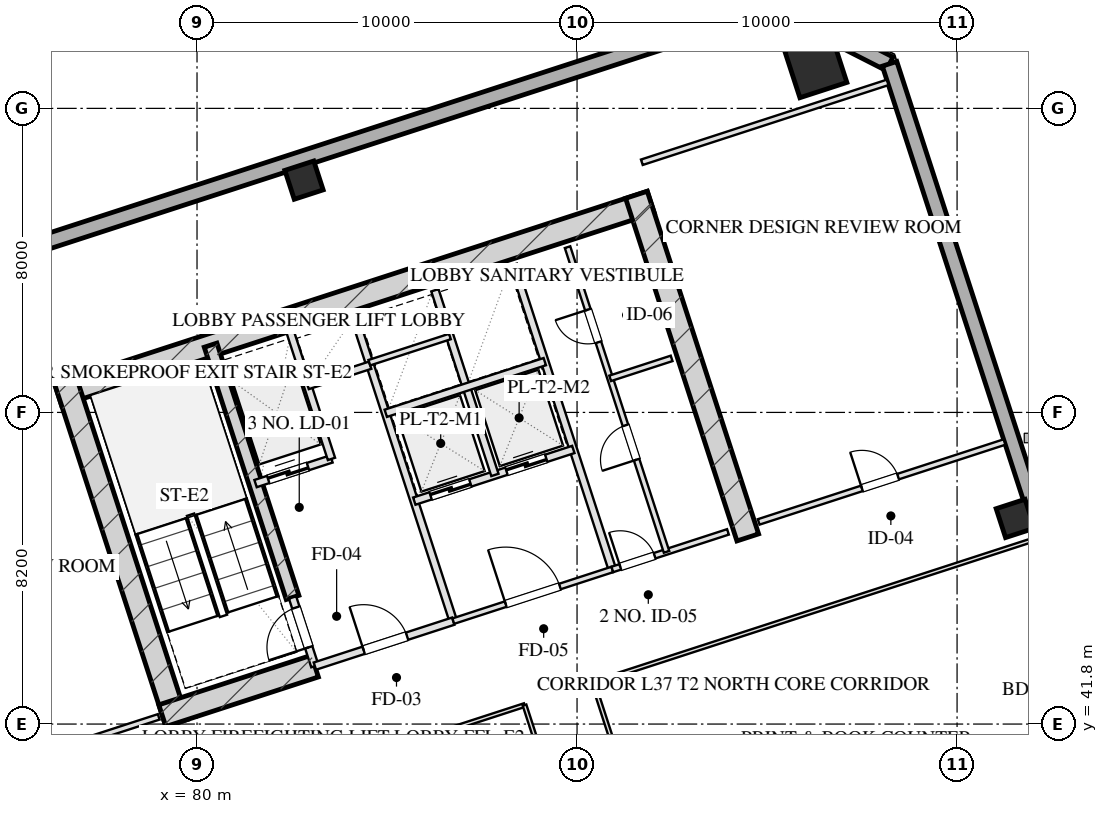
"""IFC4 building model, lengths in metres.
Left out: names, types, materials, properties, quantities, classifications, styles, units other than length and angle.
Written with IfcOpenShell. Run it as: python <this file> out.ifc"""

import sys

from ifc_helpers import new_model, si_unit, direction, frame, frame_2d, origin, origin_2d, place, context, subcontext, project, spatial, rectangle, hollow_rectangle, extrude, element, fill, save


model = new_model("IFC4")
c1 = context("Model", 3, precision=1e-05, world=origin(), true_north=direction((0.0, 1.0)))
c2 = subcontext(c1, "Body", "Model", "MODEL_VIEW")
j1 = project(units=[si_unit("LENGTHUNIT", "METRE"), si_unit("PLANEANGLEUNIT", "RADIAN")], contexts=[c1])
p1 = place(None, origin())
s1 = spatial("IfcSite", under=j1, at=p1, CompositionType="ELEMENT")
p2 = place(p1, origin())
s2 = spatial("IfcBuilding", under=s1, at=p2, CompositionType="ELEMENT")
p3 = place(p2, frame((0.0, 0.0, 142.6)))
s3 = spatial("IfcBuildingStorey", under=s2, at=p3, CompositionType="ELEMENT", Elevation=142.6)
p4 = place(p3, frame((76.344, 50.466, 0.0), z_axis=(0.0, 0.0, 1.0), x_axis=(0.951055727519, 0.309019421968, 0.0)))
e1 = element("IfcWall", 1, at=p4, inside=s3, PredefinedType="SHEAR", context=c2, shape_type="SweptSolid", body=[
    extrude(rectangle(XDim=16.4, YDim=0.6, at=frame_2d((8.2, 0.0))), origin(), (0.0, 0.0, 1.0), 3.45),
])
for number, where, z_axis, x_axis in (
    (2, (79.466, 41.828, 0.0), (0.0, 0.0, 1.0), (-0.309, 0.951, 0.0)),
    (3, (94.492, 46.71, 0.0), (0.0, 0.0, 1.0), (-0.309, 0.951, 0.0)),
):
    element("IfcWall", number, at=place(p3, frame(where, z_axis=z_axis, x_axis=x_axis)), inside=s3, PredefinedType="SHEAR", context=c2, shape_type="SweptSolid", body=[
        extrude(rectangle(XDim=9.48, YDim=0.6, at=frame_2d((4.74, 0.0))), origin(), (0.0, 0.0, 1.0), 3.45),
    ])
p5 = place(p3, frame((82.514, 45.131, 0.0), z_axis=(0.0, 0.0, 1.0), x_axis=(-0.308988790936, 0.951065679686, 0.0)))
e4 = element("IfcWall", 4, at=p5, inside=s3, PredefinedType="SHEAR", context=c2, shape_type="SweptSolid", body=[
    extrude(rectangle(XDim=6.98, YDim=0.35, at=frame_2d((3.49, 0.0))), origin(), (0.0, 0.0, 1.0), 3.45),
])
p6 = place(p3, frame((79.087, 42.021, 0.0), z_axis=(0.0, 0.0, 1.0), x_axis=(0.951062550203, 0.3089984233, 0.0)))
e5 = element("IfcWall", 5, at=p6, inside=s3, PredefinedType="SHEAR", context=c2, shape_type="SweptSolid", body=[
    extrude(rectangle(XDim=4.22, YDim=0.6, at=frame_2d((2.11, 0.0))), origin(), (0.0, 0.0, 1.0), 3.45),
])
p7 = place(p3, frame((96.281, 59.099, 0.0), z_axis=(0.0, 0.0, 1.0), x_axis=(0.951056516295, 0.309016994375, 0.0)))
e6 = element("IfcColumn", 6, at=p7, inside=s3, PredefinedType="COLUMN", context=c2, shape_type="SweptSolid", body=[
    extrude(hollow_rectangle(XDim=1.3, YDim=1.3, WallThickness=0.045, at=origin_2d()), origin(), (0.0, 0.0, 1.0), 3.451),
])
for number, where, z_axis, x_axis in (
    (7, (101.532, 47.21, 0.0), (0.0, 0.0, 1.0), (0.951, 0.309, 0.0)),
    (8, (82.815, 56.112, 0.0), (0.0, 0.0, 1.0), (0.951, 0.309, 0.0)),
):
    element("IfcColumn", number, at=place(p3, frame(where, z_axis=z_axis, x_axis=x_axis)), inside=s3, PredefinedType="COLUMN", context=c2, shape_type="SweptSolid", body=[
        extrude(hollow_rectangle(XDim=0.8, YDim=0.8, WallThickness=0.028, at=origin_2d()), origin(), (0.0, 0.0, 1.0), 3.451),
    ])
p8 = place(p3, frame((81.776, 8.827, 0.0), z_axis=(0.0, 0.0, 1.0), x_axis=(-0.309014228706, 0.951057414911, 0.0)))
e9 = element("IfcWall", 9, at=p8, inside=s3, PredefinedType="SOLIDWALL", context=c2, shape_type="SweptSolid", body=[
    extrude(rectangle(XDim=42.8, YDim=0.4, at=frame_2d((21.4, 0.0))), origin(), (0.0, 0.0, 1.0), 2.61),
])
p9 = place(p8, frame((23.95, 0.0, 0.0)))
e10 = element("IfcOpeningElement", 10, at=p9, cuts=e9, PredefinedType="OPENING", context=c2, shape_type="SweptSolid", body=[
    extrude(rectangle(XDim=1.1, YDim=2.15, at=frame_2d((0.55, 1.075))), frame((0.0, 0.21, 0.0), z_axis=(0.0, -1.0, 0.0), x_axis=(1.0, 0.0, 0.0)), (0.0, 0.0, 1.0), 0.42),
])
p10 = place(p3, frame((70.092, 52.556, 0.0), z_axis=(0.0, 0.0, 1.0), x_axis=(0.951057580055, 0.30901372044, 0.0)))
e11 = element("IfcWall", 11, at=p10, inside=s3, PredefinedType="SOLIDWALL", context=c2, shape_type="SweptSolid", body=[
    extrude(rectangle(XDim=26.4, YDim=0.4, at=frame_2d((13.2, 0.0))), origin(), (0.0, 0.0, 1.0), 2.61),
])
p11 = place(p3, frame((95.199, 60.714, 0.0), z_axis=(0.0, 0.0, 1.0), x_axis=(0.891020832027, -0.453962417932, 0.0)))
e12 = element("IfcWall", 12, at=p11, inside=s3, PredefinedType="SOLIDWALL", context=c2, shape_type="SweptSolid", body=[
    extrude(rectangle(XDim=3.394, YDim=0.4, at=frame_2d((1.697, 0.0))), origin(), (0.0, 0.0, 1.0), 2.61),
])
p12 = place(p3, frame((98.224, 59.173, 0.0), z_axis=(0.0, 0.0, 1.0), x_axis=(0.309014228706, -0.951057414911, 0.0)))
e13 = element("IfcWall", 13, at=p12, inside=s3, PredefinedType="SOLIDWALL", context=c2, shape_type="SweptSolid", body=[
    extrude(rectangle(XDim=42.8, YDim=0.4, at=frame_2d((21.4, 0.0))), origin(), (0.0, 0.0, 1.0), 2.61),
])
p13 = place(p12, frame((26.675, 0.0, 0.75)))
e14 = element("IfcOpeningElement", 14, at=p13, cuts=e13, PredefinedType="OPENING", context=c2, shape_type="SweptSolid", body=[
    extrude(rectangle(XDim=2.25, YDim=1.46, at=frame_2d((1.125, 0.73))), frame((0.0, 0.21, 0.0), z_axis=(0.0, -1.0, 0.0), x_axis=(1.0, 0.0, 0.0)), (0.0, 0.0, 1.0), 0.42),
])
p14 = place(p12, frame((16.45, 0.0, 0.0)))
e15 = element("IfcOpeningElement", 15, at=p14, cuts=e13, PredefinedType="OPENING", context=c2, shape_type="SweptSolid", body=[
    extrude(rectangle(XDim=1.1, YDim=2.15, at=frame_2d((0.55, 1.075))), frame((0.0, 0.21, 0.0), z_axis=(0.0, -1.0, 0.0), x_axis=(1.0, 0.0, 0.0)), (0.0, 0.0, 1.0), 0.42),
])
p15 = place(p3, frame((83.101, 43.324, 0.0), z_axis=(0.0, 0.0, 1.0), x_axis=(-0.309048298632, 0.951046344356, 0.0)))
e16 = element("IfcWall", 16, at=p15, inside=s3, PredefinedType="PARTITIONING", context=c2, shape_type="SweptSolid", body=[
    extrude(rectangle(XDim=1.9, YDim=0.2, at=frame_2d((0.95, 0.0))), origin(), (0.0, 0.0, 1.0), 3.175),
])
p16 = place(p15, frame((0.52, 0.0, 0.0)))
e17 = element("IfcOpeningElement", 17, at=p16, cuts=e16, PredefinedType="OPENING", context=c2, shape_type="SweptSolid", body=[
    extrude(rectangle(XDim=1.1, YDim=2.05, at=frame_2d((0.55, 1.025))), frame((0.0, 0.11, 0.0), z_axis=(0.0, -1.0, 0.0), x_axis=(1.0, 0.0, 0.0)), (0.0, 0.0, 1.0), 0.22),
])
p17 = place(p3, frame((86.743, 44.508, 0.0), z_axis=(0.0, 0.0, 1.0), x_axis=(-0.309016001439, 0.951056838919, 0.0)))
e18 = element("IfcWall", 18, at=p17, inside=s3, PredefinedType="PARTITIONING", context=c2, shape_type="SweptSolid", body=[
    extrude(rectangle(XDim=8.43, YDim=0.2, at=frame_2d((4.215, 0.0))), origin(), (0.0, 0.0, 1.0), 3.175),
])
p18 = place(p3, frame((83.101, 43.324, 0.0), z_axis=(0.0, 0.0, 1.0), x_axis=(0.951052804469, 0.309028417967, 0.0)))
e19 = element("IfcWall", 19, at=p18, inside=s3, PredefinedType="PARTITIONING", context=c2, shape_type="SweptSolid", body=[
    extrude(rectangle(XDim=3.83, YDim=0.2, at=frame_2d((1.915, 0.0))), origin(), (0.0, 0.0, 1.0), 3.175),
])
p19 = place(p18, frame((1.35, 0.0, 0.0)))
e20 = element("IfcOpeningElement", 20, at=p19, cuts=e19, PredefinedType="OPENING", context=c2, shape_type="SweptSolid", body=[
    extrude(rectangle(XDim=1.2, YDim=2.05, at=frame_2d((0.6, 1.025))), frame((0.0, 0.11, 0.0), z_axis=(0.0, -1.0, 0.0), x_axis=(1.0, 0.0, 0.0)), (0.0, 0.0, 1.0), 0.22),
])
p20 = place(p3, frame((81.54, 48.127, 0.0), z_axis=(0.0, 0.0, 1.0), x_axis=(0.951062257173, 0.308999325213, 0.0)))
e21 = element("IfcWall", 21, at=p20, inside=s3, PredefinedType="PARTITIONING", context=c2, shape_type="SweptSolid", body=[
    extrude(rectangle(XDim=2.1, YDim=0.2, at=frame_2d((1.05, 0.0))), origin(), (0.0, 0.0, 1.0), 3.175),
])
p21 = place(p20, frame((0.35, 0.0, 0.0)))
e22 = element("IfcOpeningElement", 22, at=p21, cuts=e21, PredefinedType="OPENING", context=c2, shape_type="SweptSolid", body=[
    extrude(rectangle(XDim=1.1, YDim=2.05, at=frame_2d((0.55, 1.025))), frame((0.0, 0.11, 0.0), z_axis=(0.0, -1.0, 0.0), x_axis=(1.0, 0.0, 0.0)), (0.0, 0.0, 1.0), 0.22),
])
p22 = place(p3, frame((83.538, 48.776, 0.0), z_axis=(0.0, 0.0, 1.0), x_axis=(-0.3089935693, 0.951064127245, 0.0)))
e23 = element("IfcWall", 23, at=p22, inside=s3, PredefinedType="PARTITIONING", context=c2, shape_type="SweptSolid", body=[
    extrude(rectangle(XDim=3.7, YDim=0.2, at=frame_2d((1.85, 0.0))), origin(), (0.0, 0.0, 1.0), 3.175),
])
p23 = place(p3, frame((82.91, 50.707, 0.0), z_axis=(0.0, 0.0, 1.0), x_axis=(0.951041328149, 0.309063734775, 0.0)))
e24 = element("IfcWall", 24, at=p23, inside=s3, PredefinedType="PARTITIONING", context=c2, shape_type="SweptSolid", body=[
    extrude(rectangle(XDim=1.73, YDim=0.2, at=frame_2d((0.865, 0.0))), origin(), (0.0, 0.0, 1.0), 3.175),
])
p24 = place(p3, frame((90.928, 45.868, 0.0), z_axis=(0.0, 0.0, 1.0), x_axis=(-0.309042196757, 0.951048327176, 0.0)))
e25 = element("IfcWall", 25, at=p24, inside=s3, PredefinedType="PARTITIONING", context=c2, shape_type="SweptSolid", body=[
    extrude(rectangle(XDim=8.43, YDim=0.2, at=frame_2d((4.215, 0.0))), origin(), (0.0, 0.0, 1.0), 3.175),
])
p25 = place(p3, frame((86.743, 44.508, 0.0), z_axis=(0.0, 0.0, 1.0), x_axis=(0.951063829732, 0.308994485023, 0.0)))
e26 = element("IfcWall", 26, at=p25, inside=s3, PredefinedType="PARTITIONING", context=c2, shape_type="SweptSolid", body=[
    extrude(rectangle(XDim=4.4, YDim=0.15, at=frame_2d((2.2, 0.0))), origin(), (0.0, 0.0, 1.0), 3.175),
])
p26 = place(p25, frame((1.45, 0.0, 0.0)))
e27 = element("IfcOpeningElement", 27, at=p26, cuts=e26, PredefinedType="OPENING", context=c2, shape_type="SweptSolid", body=[
    extrude(rectangle(XDim=1.5, YDim=2.05, at=frame_2d((0.75, 1.025))), frame((0.0, 0.085, 0.0), z_axis=(0.0, -1.0, 0.0), x_axis=(1.0, 0.0, 0.0)), (0.0, 0.0, 1.0), 0.17),
])
p27 = place(p3, frame((85.718, 47.666, 0.0), z_axis=(0.0, 0.0, 1.0), x_axis=(0.951058531764, 0.30901079133, 0.0)))
e28 = element("IfcWall", 28, at=p27, inside=s3, PredefinedType="PARTITIONING", context=c2, shape_type="SweptSolid", body=[
    extrude(rectangle(XDim=4.4, YDim=0.2, at=frame_2d((2.2, 0.0))), origin(), (0.0, 0.0, 1.0), 3.175),
])
p28 = place(p27, frame((0.45, 0.0, 0.0)))
e29 = element("IfcOpeningElement", 29, at=p28, cuts=e28, PredefinedType="OPENING", context=c2, shape_type="SweptSolid", body=[
    extrude(rectangle(XDim=1.1, YDim=2.05, at=frame_2d((0.55, 1.025))), frame((0.0, 0.11, 0.0), z_axis=(0.0, -1.0, 0.0), x_axis=(1.0, 0.0, 0.0)), (0.0, 0.0, 1.0), 0.22),
])
p29 = place(p27, frame((2.55, 0.0, 0.0)))
e30 = element("IfcOpeningElement", 30, at=p29, cuts=e28, PredefinedType="OPENING", context=c2, shape_type="SweptSolid", body=[
    extrude(rectangle(XDim=1.1, YDim=2.05, at=frame_2d((0.55, 1.025))), frame((0.0, 0.11, 0.0), z_axis=(0.0, -1.0, 0.0), x_axis=(1.0, 0.0, 0.0)), (0.0, 0.0, 1.0), 0.22),
])
p30 = place(p3, frame((87.838, 48.354, 0.0), z_axis=(0.0, 0.0, 1.0), x_axis=(-0.3090093719, 0.951058992953, 0.0)))
e31 = element("IfcWall", 31, at=p30, inside=s3, PredefinedType="PARTITIONING", context=c2, shape_type="SweptSolid", body=[
    extrude(rectangle(XDim=5.11, YDim=0.2, at=frame_2d((2.555, 0.0))), origin(), (0.0, 0.0, 1.0), 3.175),
])
p31 = place(p3, frame((84.967, 49.977, 0.0), z_axis=(0.0, 0.0, 1.0), x_axis=(0.951063829732, 0.308994485023, 0.0)))
e32 = element("IfcWall", 32, at=p31, inside=s3, PredefinedType="PARTITIONING", context=c2, shape_type="SweptSolid", body=[
    extrude(rectangle(XDim=4.4, YDim=0.2, at=frame_2d((2.2, 0.0))), origin(), (0.0, 0.0, 1.0), 3.175),
])
p32 = place(p3, frame((84.534, 51.308, 0.0), z_axis=(0.0, 0.0, 1.0), x_axis=(0.951075093106, 0.308959814982, 0.0)))
e33 = element("IfcWall", 33, at=p32, inside=s3, PredefinedType="PARTITIONING", context=c2, shape_type="SweptSolid", body=[
    extrude(rectangle(XDim=2.23, YDim=0.15, at=frame_2d((1.115, 0.0))), origin(), (0.0, 0.0, 1.0), 3.175),
])
p33 = place(p3, frame((90.928, 45.868, 0.0), z_axis=(0.0, 0.0, 1.0), x_axis=(0.951059297078, 0.309008435874, 0.0)))
e34 = element("IfcWall", 34, at=p33, inside=s3, PredefinedType="PARTITIONING", context=c2, shape_type="SweptSolid", body=[
    extrude(rectangle(XDim=3.2, YDim=0.15, at=frame_2d((1.6, 0.0))), origin(), (0.0, 0.0, 1.0), 3.175),
])
p34 = place(p33, frame((0.22, 0.0, 0.0)))
e35 = element("IfcOpeningElement", 35, at=p34, cuts=e34, PredefinedType="OPENING", context=c2, shape_type="SweptSolid", body=[
    extrude(rectangle(XDim=0.95, YDim=2.05, at=frame_2d((0.475, 1.025))), frame((0.0, 0.085, 0.0), z_axis=(0.0, -1.0, 0.0), x_axis=(1.0, 0.0, 0.0)), (0.0, 0.0, 1.0), 0.17),
])
p35 = place(p3, frame((92.355, 46.331, 0.0), z_axis=(0.0, 0.0, 1.0), x_axis=(-0.309007490203, 0.951059604335, 0.0)))
e36 = element("IfcWall", 36, at=p35, inside=s3, PredefinedType="PARTITIONING", context=c2, shape_type="SweptSolid", body=[
    extrude(rectangle(XDim=8.43, YDim=0.15, at=frame_2d((4.215, 0.0))), origin(), (0.0, 0.0, 1.0), 3.175),
])
p36 = place(p35, frame((2.55, 0.0, 0.0)))
e37 = element("IfcOpeningElement", 37, at=p36, cuts=e36, PredefinedType="OPENING", context=c2, shape_type="SweptSolid", body=[
    extrude(rectangle(XDim=0.95, YDim=2.05, at=frame_2d((0.475, 1.025))), frame((0.0, 0.085, 0.0), z_axis=(0.0, -1.0, 0.0), x_axis=(1.0, 0.0, 0.0)), (0.0, 0.0, 1.0), 0.17),
])
p37 = place(p35, frame((5.8, 0.0, 0.0)))
e38 = element("IfcOpeningElement", 38, at=p37, cuts=e36, PredefinedType="OPENING", context=c2, shape_type="SweptSolid", body=[
    extrude(rectangle(XDim=0.9, YDim=2.05, at=frame_2d((0.45, 1.025))), frame((0.0, 0.085, 0.0), z_axis=(0.0, -1.0, 0.0), x_axis=(1.0, 0.0, 0.0)), (0.0, 0.0, 1.0), 0.17),
])
p38 = place(p3, frame((90.871, 50.896, 0.0), z_axis=(0.0, 0.0, 1.0), x_axis=(0.951054116971, 0.309024378638, 0.0)))
e39 = element("IfcWall", 39, at=p38, inside=s3, PredefinedType="PARTITIONING", context=c2, shape_type="SweptSolid", body=[
    extrude(rectangle(XDim=1.7, YDim=0.15, at=frame_2d((0.85, 0.0))), origin(), (0.0, 0.0, 1.0), 3.175),
])
p39 = place(p3, frame((71.955, 39.703, 0.0), z_axis=(0.0, 0.0, 1.0), x_axis=(0.951060977215, 0.309003264738, 0.0)))
e40 = element("IfcWall", 40, at=p39, inside=s3, PredefinedType="PARTITIONING", context=c2, shape_type="SweptSolid", body=[
    extrude(rectangle(XDim=7.4, YDim=0.15, at=frame_2d((3.7, 0.0))), origin(), (0.0, 0.0, 1.0), 3.175),
])
p40 = place(p39, frame((3.108, 0.0, 0.0)))
e41 = element("IfcOpeningElement", 41, at=p40, cuts=e40, PredefinedType="OPENING", context=c2, shape_type="SweptSolid", body=[
    extrude(rectangle(XDim=1.05, YDim=2.05, at=frame_2d((0.525, 1.025))), frame((0.0, 0.085, 0.0), z_axis=(0.0, -1.0, 0.0), x_axis=(1.0, 0.0, 0.0)), (0.0, 0.0, 1.0), 0.17),
])
p41 = place(p3, frame((91.705, 56.582, 0.0), z_axis=(0.0, 0.0, 1.0), x_axis=(0.951057811516, 0.309013008068, 0.0)))
e42 = element("IfcWall", 42, at=p41, inside=s3, PredefinedType="PARTITIONING", context=c2, shape_type="SweptSolid", body=[
    extrude(rectangle(XDim=6.8, YDim=0.15, at=frame_2d((3.4, 0.0))), origin(), (0.0, 0.0, 1.0), 3.175),
])
p42 = place(p3, frame((94.78, 47.119, 0.0), z_axis=(0.0, 0.0, 1.0), x_axis=(0.951057811516, 0.309013008068, 0.0)))
e43 = element("IfcWall", 43, at=p42, inside=s3, PredefinedType="PARTITIONING", context=c2, shape_type="SweptSolid", body=[
    extrude(rectangle(XDim=6.8, YDim=0.15, at=frame_2d((3.4, 0.0))), origin(), (0.0, 0.0, 1.0), 3.175),
])
p43 = place(p42, frame((2.856, 0.0, 0.0)))
e44 = element("IfcOpeningElement", 44, at=p43, cuts=e43, PredefinedType="OPENING", context=c2, shape_type="SweptSolid", body=[
    extrude(rectangle(XDim=1.0, YDim=2.05, at=frame_2d((0.5, 1.025))), frame((0.0, 0.085, 0.0), z_axis=(0.0, -1.0, 0.0), x_axis=(1.0, 0.0, 0.0)), (0.0, 0.0, 1.0), 0.17),
])
p44 = place(p3, frame((80.106, 39.533, 0.0), z_axis=(0.0, 0.0, 1.0), x_axis=(0.951059123431, 0.309008970321, 0.0)))
e45 = element("IfcWall", 45, at=p44, inside=s3, PredefinedType="MOVABLE", context=c2, shape_type="SweptSolid", body=[
    extrude(rectangle(XDim=8.95, YDim=0.1, at=frame_2d((4.475, 0.0))), origin(), (0.0, 0.0, 1.0), 3.175),
])
p45 = place(p3, frame((90.425, 42.886, 0.0), z_axis=(0.0, 0.0, 1.0), x_axis=(0.95105749975, 0.309013967595, 0.0)))
e46 = element("IfcWall", 46, at=p45, inside=s3, PredefinedType="MOVABLE", context=c2, shape_type="SweptSolid", body=[
    extrude(rectangle(XDim=12.25, YDim=0.1, at=frame_2d((6.125, 0.0))), origin(), (0.0, 0.0, 1.0), 3.175),
])
p46 = place(p3, frame((93.76, 26.473, 0.0), z_axis=(0.0, 0.0, 1.0), x_axis=(-0.309004459387, 0.951060589068, 0.0)))
e47 = element("IfcWall", 47, at=p46, inside=s3, PredefinedType="MOVABLE", context=c2, shape_type="SweptSolid", body=[
    extrude(rectangle(XDim=16.64, YDim=0.1, at=frame_2d((8.32, 0.0))), origin(), (0.0, 0.0, 1.0), 3.175),
])
p47 = place(p46, frame((7.68, 0.0, 0.0)))
e48 = element("IfcOpeningElement", 48, at=p47, cuts=e47, PredefinedType="OPENING", context=c2, shape_type="SweptSolid", body=[
    extrude(rectangle(XDim=1.1, YDim=2.05, at=frame_2d((0.55, 1.025))), frame((0.0, 0.06, 0.0), z_axis=(0.0, -1.0, 0.0), x_axis=(1.0, 0.0, 0.0)), (0.0, 0.0, 1.0), 0.12),
])
p48 = place(p3, frame((95.567, 27.061, 0.0), z_axis=(0.0, 0.0, 1.0), x_axis=(-0.30901773025, 0.951056277195, 0.0)))
e49 = element("IfcWall", 49, at=p48, inside=s3, PredefinedType="MOVABLE", context=c2, shape_type="SweptSolid", body=[
    extrude(rectangle(XDim=16.64, YDim=0.1, at=frame_2d((8.32, 0.0))), origin(), (0.0, 0.0, 1.0), 3.175),
])
p49 = place(p48, frame((1.66, 0.0, 0.0)))
e50 = element("IfcOpeningElement", 50, at=p49, cuts=e49, PredefinedType="OPENING", context=c2, shape_type="SweptSolid", body=[
    extrude(rectangle(XDim=1.0, YDim=2.05, at=frame_2d((0.5, 1.025))), frame((0.0, 0.06, 0.0), z_axis=(0.0, -1.0, 0.0), x_axis=(1.0, 0.0, 0.0)), (0.0, 0.0, 1.0), 0.12),
])
p50 = place(p48, frame((6.42, 0.0, 0.0)))
e51 = element("IfcOpeningElement", 51, at=p50, cuts=e49, PredefinedType="OPENING", context=c2, shape_type="SweptSolid", body=[
    extrude(rectangle(XDim=1.0, YDim=2.05, at=frame_2d((0.5, 1.025))), frame((0.0, 0.06, 0.0), z_axis=(0.0, -1.0, 0.0), x_axis=(1.0, 0.0, 0.0)), (0.0, 0.0, 1.0), 0.12),
])
p51 = place(p48, frame((12.58, 0.0, 0.0)))
e52 = element("IfcOpeningElement", 52, at=p51, cuts=e49, PredefinedType="OPENING", context=c2, shape_type="SweptSolid", body=[
    extrude(rectangle(XDim=1.0, YDim=2.05, at=frame_2d((0.5, 1.025))), frame((0.0, 0.06, 0.0), z_axis=(0.0, -1.0, 0.0), x_axis=(1.0, 0.0, 0.0)), (0.0, 0.0, 1.0), 0.12),
])
p52 = place(p16, origin())
e53 = element("IfcDoor", 53, at=p52, inside=s3, OperationType="SINGLE_SWING_LEFT", PredefinedType="DOOR", context=c2, shape_type="SweptSolid", body=[
    extrude(rectangle(XDim=1.1, YDim=2.05, at=frame_2d((0.55, 1.025))), frame((0.0, 0.025, 0.0), z_axis=(0.0, -1.0, 0.0), x_axis=(1.0, 0.0, 0.0)), (0.0, 0.0, 1.0), 0.05),
])
fill(e17, e53)
p53 = place(p19, origin())
e54 = element("IfcDoor", 54, at=p53, inside=s3, OperationType="SINGLE_SWING_LEFT", PredefinedType="DOOR", context=c2, shape_type="SweptSolid", body=[
    extrude(rectangle(XDim=1.2, YDim=2.05, at=frame_2d((0.6, 1.025))), frame((0.0, 0.025, 0.0), z_axis=(0.0, -1.0, 0.0), x_axis=(1.0, 0.0, 0.0)), (0.0, 0.0, 1.0), 0.05),
])
fill(e20, e54)
p54 = place(p21, origin())
e55 = element("IfcDoor", 55, at=p54, inside=s3, OperationType="DOUBLE_DOOR_SLIDING", PredefinedType="DOOR", context=c2, shape_type="SweptSolid", body=[
    extrude(rectangle(XDim=1.1, YDim=2.05, at=frame_2d((0.55, 1.025))), frame((0.0, 0.025, 0.0), z_axis=(0.0, -1.0, 0.0), x_axis=(1.0, 0.0, 0.0)), (0.0, 0.0, 1.0), 0.05),
])
fill(e22, e55)
p55 = place(p26, origin())
e56 = element("IfcDoor", 56, at=p55, inside=s3, OperationType="SINGLE_SWING_LEFT", PredefinedType="DOOR", context=c2, shape_type="SweptSolid", body=[
    extrude(rectangle(XDim=1.5, YDim=2.05, at=frame_2d((0.75, 1.025))), frame((0.0, 0.025, 0.0), z_axis=(0.0, -1.0, 0.0), x_axis=(1.0, 0.0, 0.0)), (0.0, 0.0, 1.0), 0.05),
])
fill(e27, e56)
p56 = place(p28, origin())
e57 = element("IfcDoor", 57, at=p56, inside=s3, OperationType="DOUBLE_DOOR_SLIDING", PredefinedType="DOOR", context=c2, shape_type="SweptSolid", body=[
    extrude(rectangle(XDim=1.1, YDim=2.05, at=frame_2d((0.55, 1.025))), frame((0.0, 0.025, 0.0), z_axis=(0.0, -1.0, 0.0), x_axis=(1.0, 0.0, 0.0)), (0.0, 0.0, 1.0), 0.05),
])
fill(e29, e57)
p57 = place(p29, origin())
e58 = element("IfcDoor", 58, at=p57, inside=s3, OperationType="DOUBLE_DOOR_SLIDING", PredefinedType="DOOR", context=c2, shape_type="SweptSolid", body=[
    extrude(rectangle(XDim=1.1, YDim=2.05, at=frame_2d((0.55, 1.025))), frame((0.0, 0.025, 0.0), z_axis=(0.0, -1.0, 0.0), x_axis=(1.0, 0.0, 0.0)), (0.0, 0.0, 1.0), 0.05),
])
fill(e30, e58)
p58 = place(p34, origin())
e59 = element("IfcDoor", 59, at=p58, inside=s3, OperationType="SINGLE_SWING_LEFT", PredefinedType="DOOR", context=c2, shape_type="SweptSolid", body=[
    extrude(rectangle(XDim=0.95, YDim=2.05, at=frame_2d((0.475, 1.025))), frame((0.0, 0.025, 0.0), z_axis=(0.0, -1.0, 0.0), x_axis=(1.0, 0.0, 0.0)), (0.0, 0.0, 1.0), 0.05),
])
fill(e35, e59)
p59 = place(p36, origin())
e60 = element("IfcDoor", 60, at=p59, inside=s3, OperationType="SINGLE_SWING_LEFT", PredefinedType="DOOR", context=c2, shape_type="SweptSolid", body=[
    extrude(rectangle(XDim=0.95, YDim=2.05, at=frame_2d((0.475, 1.025))), frame((0.0, 0.025, 0.0), z_axis=(0.0, -1.0, 0.0), x_axis=(1.0, 0.0, 0.0)), (0.0, 0.0, 1.0), 0.05),
])
fill(e37, e60)
p60 = place(p37, origin())
e61 = element("IfcDoor", 61, at=p60, inside=s3, OperationType="SINGLE_SWING_RIGHT", PredefinedType="DOOR", context=c2, shape_type="SweptSolid", body=[
    extrude(rectangle(XDim=0.9, YDim=2.05, at=frame_2d((0.45, 1.025))), frame((0.0, 0.025, 0.0), z_axis=(0.0, -1.0, 0.0), x_axis=(1.0, 0.0, 0.0)), (0.0, 0.0, 1.0), 0.05),
])
fill(e38, e61)
p61 = place(p43, origin())
e62 = element("IfcDoor", 62, at=p61, inside=s3, OperationType="SINGLE_SWING_LEFT", PredefinedType="DOOR", context=c2, shape_type="SweptSolid", body=[
    extrude(rectangle(XDim=1.0, YDim=2.05, at=frame_2d((0.5, 1.025))), frame((0.0, 0.025, 0.0), z_axis=(0.0, -1.0, 0.0), x_axis=(1.0, 0.0, 0.0)), (0.0, 0.0, 1.0), 0.05),
])
fill(e44, e62)
save(model, sys.argv[1])
